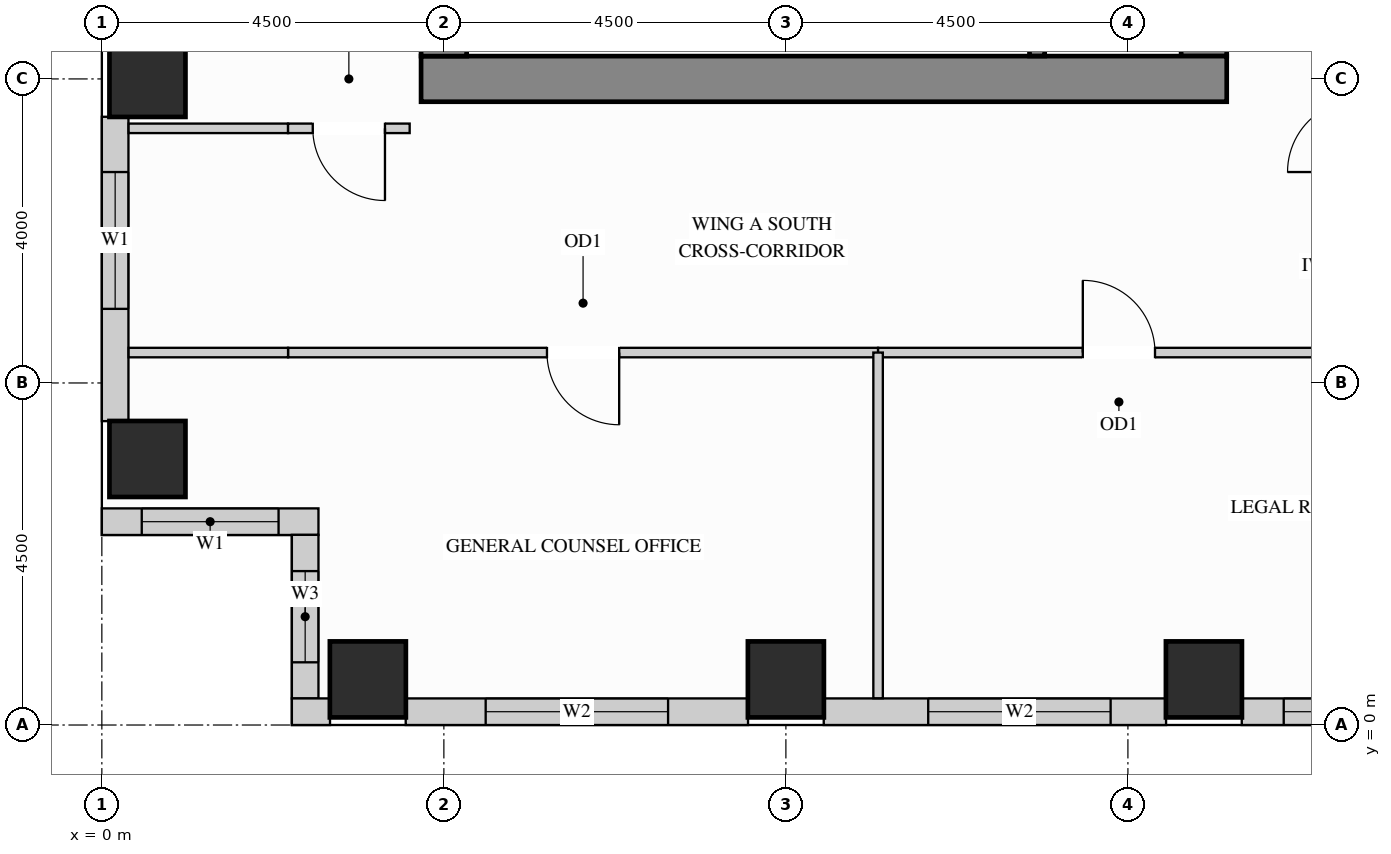
"""IFC4 building model, lengths in metres.
Left out: names, types, materials, properties, quantities, classifications, styles, units other than length and angle.
Written with IfcOpenShell. Run it as: python <this file> out.ifc"""

import sys

from ifc_helpers import new_model, si_unit, direction, frame, frame_2d, origin, origin_2d, place, context, subcontext, project, spatial, rectangle, extrude, source, transform, mapped, element, fill, save


model = new_model("IFC4")
c1 = context("Model", 3, precision=1e-05, world=origin(), true_north=direction((0.0, 1.0)))
c2 = subcontext(c1, "Body", "Model", "MODEL_VIEW")
j1 = project(units=[si_unit("LENGTHUNIT", "METRE"), si_unit("PLANEANGLEUNIT", "RADIAN")], contexts=[c1])
p1 = place(None, origin())
s1 = spatial("IfcSite", under=j1, at=p1, CompositionType="ELEMENT")
p2 = place(p1, origin())
s2 = spatial("IfcBuilding", under=s1, at=p2, CompositionType="ELEMENT")
p3 = place(p2, frame((0.0, 0.0, 153.9)))
s3 = spatial("IfcBuildingStorey", under=s2, at=p3, CompositionType="ELEMENT", Elevation=153.9)
m1 = source(origin(), c2, "Body", "SweptSolid", [
    extrude(rectangle(XDim=1.0, YDim=1.0, at=origin_2d()), origin(), (0.0, 0.0, 1.0), 3.4),
])
for number, where, z_axis, x_axis in (
    (1, (14.5, 0.6, 0.0), (0.0, 0.0, 1.0), (1.0, 0.0, 0.0)),
    (2, (3.5, 0.6, 0.0), (0.0, 0.0, 1.0), (1.0, 0.0, 0.0)),
    (3, (9.0, 0.6, 0.0), (0.0, 0.0, 1.0), (1.0, 0.0, 0.0)),
    (4, (0.6, 3.5, 0.0), (0.0, 0.0, 1.0), (1.0, 0.0, 0.0)),
    (5, (0.6, 8.5, 0.0), (0.0, 0.0, 1.0), (1.0, 0.0, 0.0)),
):
    element("IfcColumn", number, at=place(p3, frame(where, z_axis=z_axis, x_axis=x_axis)), inside=s3, PredefinedType="COLUMN", context=c2, shape_type="MappedRepresentation", body=[
        mapped(m1, transform((0.0, 0.0, 0.0), x_axis=(1.0, 0.0, 0.0), y_axis=(0.0, 1.0, 0.0), z_axis=(0.0, 0.0, 1.0))),
    ])
m2 = source(origin(), c2, "Body", "SweptSolid", [
    extrude(rectangle(XDim=10.02, YDim=0.6, at=frame_2d((5.01, 0.0))), origin(), (0.0, 0.0, 1.0), 3.4),
])
p4 = place(p3, frame((14.5, 8.8, 0.0), z_axis=(0.0, 0.0, 1.0), x_axis=(0.0, 1.0, 0.0)))
e6 = element("IfcWall", 6, at=p4, inside=s3, PredefinedType="SHEAR", context=c2, shape_type="MappedRepresentation", body=[
    mapped(m2, transform((0.0, 0.0, 0.0), x_axis=(1.0, 0.0, 0.0), y_axis=(0.0, 1.0, 0.0), z_axis=(0.0, 0.0, 1.0))),
])
m3 = source(origin(), c2, "Body", "SweptSolid", [
    extrude(rectangle(XDim=10.6, YDim=0.6, at=frame_2d((5.3, 0.0))), origin(), (0.0, 0.0, 1.0), 3.4),
])
p5 = place(p3, frame((4.2, 8.5, 0.0), z_axis=(0.0, 0.0, 1.0), x_axis=(1.0, 0.0, 0.0)))
e7 = element("IfcWall", 7, at=p5, inside=s3, PredefinedType="SHEAR", context=c2, shape_type="MappedRepresentation", body=[
    mapped(m3, transform((0.0, 0.0, 0.0), x_axis=(1.0, 0.0, 0.0), y_axis=(0.0, 1.0, 0.0), z_axis=(0.0, 0.0, 1.0))),
])
m4 = source(origin(), c2, "Body", "SweptSolid", [
    extrude(rectangle(XDim=20.4, YDim=0.6, at=frame_2d((10.2, 0.0))), origin(), (0.0, 0.0, 1.0), 3.4),
])
p6 = place(p3, frame((4.5, 8.8, 0.0), z_axis=(0.0, 0.0, 1.0), x_axis=(0.0, 1.0, 0.0)))
e8 = element("IfcWall", 8, at=p6, inside=s3, PredefinedType="SHEAR", context=c2, shape_type="MappedRepresentation", body=[
    mapped(m4, transform((0.0, 0.0, 0.0), x_axis=(1.0, 0.0, 0.0), y_axis=(0.0, 1.0, 0.0), z_axis=(0.0, 0.0, 1.0))),
])
p7 = place(p3, frame((0.175, 8.002, 0.0), z_axis=(0.0, 0.0, 1.0), x_axis=(0.0, -1.0, 0.0)))
e9 = element("IfcWall", 9, at=p7, inside=s3, PredefinedType="SOLIDWALL", context=c2, shape_type="SweptSolid", body=[
    extrude(rectangle(XDim=4.004, YDim=0.35, at=frame_2d((2.002, 0.0))), origin(), (0.0, 0.0, 1.0), 2.612),
])
p8 = place(p7, frame((0.727, 0.0, 0.78)))
e10 = element("IfcOpeningElement", 10, at=p8, cuts=e9, PredefinedType="OPENING", context=c2, shape_type="SweptSolid", body=[
    extrude(rectangle(XDim=1.8, YDim=1.652, at=frame_2d((0.9, 0.826))), frame((0.0, 0.185, 0.0), z_axis=(0.0, -1.0, 0.0), x_axis=(1.0, 0.0, 0.0)), (0.0, 0.0, 1.0), 0.37),
])
p9 = place(p3, frame((0.0, 2.675, 0.0), z_axis=(0.0, 0.0, 1.0), x_axis=(1.0, 0.0, 0.0)))
e11 = element("IfcWall", 11, at=p9, inside=s3, PredefinedType="SOLIDWALL", context=c2, shape_type="SweptSolid", body=[
    extrude(rectangle(XDim=2.85, YDim=0.35, at=frame_2d((1.425, 0.0))), origin(), (0.0, 0.0, 1.0), 3.385),
])
p10 = place(p9, frame((0.525, 0.0, 0.78)))
e12 = element("IfcOpeningElement", 12, at=p10, cuts=e11, PredefinedType="OPENING", context=c2, shape_type="SweptSolid", body=[
    extrude(rectangle(XDim=1.8, YDim=2.1, at=frame_2d((0.9, 1.05))), frame((0.0, 0.185, 0.0), z_axis=(0.0, -1.0, 0.0), x_axis=(1.0, 0.0, 0.0)), (0.0, 0.0, 1.0), 0.37),
])
p11 = place(p3, frame((2.675, 2.502, 0.0), z_axis=(0.0, 0.0, 1.0), x_axis=(0.0, -1.0, 0.0)))
e13 = element("IfcWall", 13, at=p11, inside=s3, PredefinedType="SOLIDWALL", context=c2, shape_type="SweptSolid", body=[
    extrude(rectangle(XDim=2.154, YDim=0.35, at=frame_2d((1.077, 0.0))), origin(), (0.0, 0.0, 1.0), 3.385),
])
p12 = place(p11, frame((0.477, 0.0, 0.78)))
e14 = element("IfcOpeningElement", 14, at=p12, cuts=e13, PredefinedType="OPENING", context=c2, shape_type="SweptSolid", body=[
    extrude(rectangle(XDim=1.2, YDim=2.1, at=frame_2d((0.6, 1.05))), frame((0.0, 0.185, 0.0), z_axis=(0.0, -1.0, 0.0), x_axis=(1.0, 0.0, 0.0)), (0.0, 0.0, 1.0), 0.37),
])
m5 = source(origin(), c2, "Body", "SweptSolid", [
    extrude(rectangle(XDim=0.502, YDim=0.35, at=frame_2d((0.251, 0.0))), origin(), (0.0, 0.0, 1.0), 3.385),
])
p13 = place(p3, frame((2.5, 0.175, 0.0), z_axis=(0.0, 0.0, 1.0), x_axis=(1.0, 0.0, 0.0)))
e15 = element("IfcWall", 15, at=p13, inside=s3, PredefinedType="SOLIDWALL", context=c2, shape_type="MappedRepresentation", body=[
    mapped(m5, transform((0.0, 0.0, 0.0), x_axis=(1.0, 0.0, 0.0), y_axis=(0.0, 1.0, 0.0), z_axis=(0.0, 0.0, 1.0))),
])
p14 = place(p3, frame((3.998, 0.175, 0.0), z_axis=(0.0, 0.0, 1.0), x_axis=(1.0, 0.0, 0.0)))
e16 = element("IfcWall", 16, at=p14, inside=s3, PredefinedType="SOLIDWALL", context=c2, shape_type="SweptSolid", body=[
    extrude(rectangle(XDim=4.504, YDim=0.35, at=frame_2d((2.252, 0.0))), origin(), (0.0, 0.0, 1.0), 2.612),
])
p15 = place(p14, frame((1.052, 0.0, 0.78)))
e17 = element("IfcOpeningElement", 17, at=p15, cuts=e16, PredefinedType="OPENING", context=c2, shape_type="SweptSolid", body=[
    extrude(rectangle(XDim=2.4, YDim=1.652, at=frame_2d((1.2, 0.826))), frame((0.0, 0.185, 0.0), z_axis=(0.0, -1.0, 0.0), x_axis=(1.0, 0.0, 0.0)), (0.0, 0.0, 1.0), 0.37),
])
p16 = place(p3, frame((9.498, 0.175, 0.0), z_axis=(0.0, 0.0, 1.0), x_axis=(1.0, 0.0, 0.0)))
e18 = element("IfcWall", 18, at=p16, inside=s3, PredefinedType="SOLIDWALL", context=c2, shape_type="SweptSolid", body=[
    extrude(rectangle(XDim=4.504, YDim=0.35, at=frame_2d((2.252, 0.0))), origin(), (0.0, 0.0, 1.0), 2.612),
])
p17 = place(p16, frame((1.375, 0.0, 0.78)))
e19 = element("IfcOpeningElement", 19, at=p17, cuts=e18, PredefinedType="OPENING", context=c2, shape_type="SweptSolid", body=[
    extrude(rectangle(XDim=2.4, YDim=1.652, at=frame_2d((1.2, 0.826))), frame((0.0, 0.185, 0.0), z_axis=(0.0, -1.0, 0.0), x_axis=(1.0, 0.0, 0.0)), (0.0, 0.0, 1.0), 0.37),
])
p18 = place(p3, frame((14.998, 0.175, 0.0), z_axis=(0.0, 0.0, 1.0), x_axis=(1.0, 0.0, 0.0)))
e20 = element("IfcWall", 20, at=p18, inside=s3, PredefinedType="SOLIDWALL", context=c2, shape_type="SweptSolid", body=[
    extrude(rectangle(XDim=3.504, YDim=0.35, at=frame_2d((1.752, 0.0))), origin(), (0.0, 0.0, 1.0), 2.612),
])
p19 = place(p18, frame((0.552, 0.0, 0.78)))
e21 = element("IfcOpeningElement", 21, at=p19, cuts=e20, PredefinedType="OPENING", context=c2, shape_type="SweptSolid", body=[
    extrude(rectangle(XDim=2.4, YDim=1.652, at=frame_2d((1.2, 0.826))), frame((0.0, 0.185, 0.0), z_axis=(0.0, -1.0, 0.0), x_axis=(1.0, 0.0, 0.0)), (0.0, 0.0, 1.0), 0.37),
])
m6 = source(origin(), c2, "Body", "SweptSolid", [
    extrude(rectangle(XDim=2.098, YDim=0.125, at=frame_2d((1.049, 0.0))), origin(), (0.0, 0.0, 1.0), 3.385),
])
p20 = place(p3, frame((0.352, 7.85, 0.0), z_axis=(0.0, 0.0, 1.0), x_axis=(1.0, 0.0, 0.0)))
e22 = element("IfcWall", 22, at=p20, inside=s3, PredefinedType="PARTITIONING", context=c2, shape_type="MappedRepresentation", body=[
    mapped(m6, transform((0.0, 0.0, 0.0), x_axis=(1.0, 0.0, 0.0), y_axis=(0.0, 1.0, 0.0), z_axis=(0.0, 0.0, 1.0))),
])
p21 = place(p3, frame((2.45, 7.85, 0.0), z_axis=(0.0, 0.0, 1.0), x_axis=(1.0, 0.0, 0.0)))
e23 = element("IfcWall", 23, at=p21, inside=s3, PredefinedType="PARTITIONING", context=c2, shape_type="SweptSolid", body=[
    extrude(rectangle(XDim=1.6, YDim=0.125, at=frame_2d((0.8, 0.0))), origin(), (0.0, 0.0, 1.0), 3.385),
])
p22 = place(p21, frame((0.325, 0.0, 0.0)))
e24 = element("IfcOpeningElement", 24, at=p22, cuts=e23, PredefinedType="OPENING", context=c2, shape_type="SweptSolid", body=[
    extrude(rectangle(XDim=0.95, YDim=2.15, at=frame_2d((0.475, 1.075))), frame((0.0, 0.073, 0.0), z_axis=(0.0, -1.0, 0.0), x_axis=(1.0, 0.0, 0.0)), (0.0, 0.0, 1.0), 0.145),
])
p23 = place(p3, frame((2.45, 4.9, 0.0), z_axis=(0.0, 0.0, 1.0), x_axis=(1.0, 0.0, 0.0)))
e25 = element("IfcWall", 25, at=p23, inside=s3, PredefinedType="PARTITIONING", context=c2, shape_type="SweptSolid", body=[
    extrude(rectangle(XDim=7.763, YDim=0.125, at=frame_2d((3.881, 0.0))), origin(), (0.0, 0.0, 1.0), 2.848),
])
p24 = place(p23, frame((3.406, 0.0, 0.0)))
e26 = element("IfcOpeningElement", 26, at=p24, cuts=e25, PredefinedType="OPENING", context=c2, shape_type="SweptSolid", body=[
    extrude(rectangle(XDim=0.95, YDim=2.15, at=frame_2d((0.475, 1.075))), frame((0.0, 0.073, 0.0), z_axis=(0.0, -1.0, 0.0), x_axis=(1.0, 0.0, 0.0)), (0.0, 0.0, 1.0), 0.145),
])
p25 = place(p3, frame((10.213, 4.9, 0.0), z_axis=(0.0, 0.0, 1.0), x_axis=(1.0, 0.0, 0.0)))
e27 = element("IfcWall", 27, at=p25, inside=s3, PredefinedType="PARTITIONING", context=c2, shape_type="SweptSolid", body=[
    extrude(rectangle(XDim=6.337, YDim=0.125, at=frame_2d((3.168, 0.0))), origin(), (0.0, 0.0, 1.0), 2.848),
])
p26 = place(p25, frame((2.694, 0.0, 0.0)))
e28 = element("IfcOpeningElement", 28, at=p26, cuts=e27, PredefinedType="OPENING", context=c2, shape_type="SweptSolid", body=[
    extrude(rectangle(XDim=0.95, YDim=2.15, at=frame_2d((0.475, 1.075))), frame((0.0, 0.073, 0.0), z_axis=(0.0, -1.0, 0.0), x_axis=(1.0, 0.0, 0.0)), (0.0, 0.0, 1.0), 0.145),
])
m7 = source(origin(), c2, "Body", "SweptSolid", [
    extrude(rectangle(XDim=2.098, YDim=0.125, at=frame_2d((1.049, 0.0))), origin(), (0.0, 0.0, 1.0), 2.848),
])
p27 = place(p3, frame((0.352, 4.9, 0.0), z_axis=(0.0, 0.0, 1.0), x_axis=(1.0, 0.0, 0.0)))
e29 = element("IfcWall", 29, at=p27, inside=s3, PredefinedType="PARTITIONING", context=c2, shape_type="MappedRepresentation", body=[
    mapped(m7, transform((0.0, 0.0, 0.0), x_axis=(1.0, 0.0, 0.0), y_axis=(0.0, 1.0, 0.0), z_axis=(0.0, 0.0, 1.0))),
])
m8 = source(origin(), c2, "Body", "SweptSolid", [
    extrude(rectangle(XDim=4.548, YDim=0.125, at=frame_2d((2.274, 0.0))), origin(), (0.0, 0.0, 1.0), 3.385),
])
p28 = place(p3, frame((10.213, 0.352, 0.0), z_axis=(0.0, 0.0, 1.0), x_axis=(0.0, 1.0, 0.0)))
e30 = element("IfcWall", 30, at=p28, inside=s3, PredefinedType="PARTITIONING", context=c2, shape_type="MappedRepresentation", body=[
    mapped(m8, transform((0.0, 0.0, 0.0), x_axis=(1.0, 0.0, 0.0), y_axis=(0.0, 1.0, 0.0), z_axis=(0.0, 0.0, 1.0))),
])
m9 = source(origin(), c2, "Body", "SweptSolid", [
    extrude(rectangle(XDim=3.753, YDim=0.2, at=frame_2d((1.876, 0.0))), origin(), (0.0, 0.0, 1.0), 3.4),
])
p29 = place(p3, frame((12.305, 8.802, 0.0), z_axis=(0.0, 0.0, 1.0), x_axis=(0.0, 1.0, 0.0)))
e31 = element("IfcWall", 31, at=p29, inside=s3, PredefinedType="SHEAR", context=c2, shape_type="MappedRepresentation", body=[
    mapped(m9, transform((0.0, 0.0, 0.0), x_axis=(1.0, 0.0, 0.0), y_axis=(0.0, 1.0, 0.0), z_axis=(0.0, 0.0, 1.0))),
])
m10 = source(origin(), c2, "Body", "SweptSolid", [
    extrude(rectangle(XDim=0.95, YDim=2.15, at=frame_2d((0.475, 1.075))), frame((0.0, 0.025, 0.0), z_axis=(0.0, -1.0, 0.0), x_axis=(1.0, 0.0, 0.0)), (0.0, 0.0, 1.0), 0.05),
])
p30 = place(p24, origin())
e32 = element("IfcDoor", 32, at=p30, inside=s3, OperationType="SINGLE_SWING_RIGHT", PredefinedType="DOOR", context=c2, shape_type="MappedRepresentation", body=[
    mapped(m10, transform((0.0, 0.0, 0.0), x_axis=(1.0, 0.0, 0.0), y_axis=(0.0, 1.0, 0.0), z_axis=(0.0, 0.0, 1.0))),
])
fill(e26, e32)
p31 = place(p26, origin())
e33 = element("IfcDoor", 33, at=p31, inside=s3, OperationType="SINGLE_SWING_LEFT", PredefinedType="DOOR", context=c2, shape_type="MappedRepresentation", body=[
    mapped(m10, transform((0.0, 0.0, 0.0), x_axis=(1.0, 0.0, 0.0), y_axis=(0.0, 1.0, 0.0), z_axis=(0.0, 0.0, 1.0))),
])
fill(e28, e33)
p32 = place(p22, origin())
e34 = element("IfcDoor", 34, at=p32, inside=s3, OperationType="SINGLE_SWING_RIGHT", PredefinedType="DOOR", context=c2, shape_type="MappedRepresentation", body=[
    mapped(m10, transform((0.0, 0.0, 0.0), x_axis=(1.0, 0.0, 0.0), y_axis=(0.0, 1.0, 0.0), z_axis=(0.0, 0.0, 1.0))),
])
fill(e24, e34)
m11 = source(origin(), c2, "Body", "SweptSolid", [
    extrude(rectangle(XDim=1.8, YDim=1.652, at=frame_2d((0.9, 0.826))), frame((0.0, 0.03, 0.0), z_axis=(0.0, -1.0, 0.0), x_axis=(1.0, 0.0, 0.0)), (0.0, 0.0, 1.0), 0.06),
])
p33 = place(p8, origin())
e35 = element("IfcWindow", 35, at=p33, inside=s3, PartitioningType="SINGLE_PANEL", PredefinedType="WINDOW", context=c2, shape_type="MappedRepresentation", body=[
    mapped(m11, transform((0.0, 0.0, 0.0), x_axis=(1.0, 0.0, 0.0), y_axis=(0.0, 1.0, 0.0), z_axis=(0.0, 0.0, 1.0))),
])
fill(e10, e35)
m12 = source(origin(), c2, "Body", "SweptSolid", [
    extrude(rectangle(XDim=1.8, YDim=2.1, at=frame_2d((0.9, 1.05))), frame((0.0, 0.03, 0.0), z_axis=(0.0, -1.0, 0.0), x_axis=(1.0, 0.0, 0.0)), (0.0, 0.0, 1.0), 0.06),
])
p34 = place(p10, origin())
e36 = element("IfcWindow", 36, at=p34, inside=s3, PartitioningType="SINGLE_PANEL", PredefinedType="WINDOW", context=c2, shape_type="MappedRepresentation", body=[
    mapped(m12, transform((0.0, 0.0, 0.0), x_axis=(1.0, 0.0, 0.0), y_axis=(0.0, 1.0, 0.0), z_axis=(0.0, 0.0, 1.0))),
])
fill(e12, e36)
m13 = source(origin(), c2, "Body", "SweptSolid", [
    extrude(rectangle(XDim=2.4, YDim=1.652, at=frame_2d((1.2, 0.826))), frame((0.0, 0.03, 0.0), z_axis=(0.0, -1.0, 0.0), x_axis=(1.0, 0.0, 0.0)), (0.0, 0.0, 1.0), 0.06),
])
p35 = place(p15, origin())
e37 = element("IfcWindow", 37, at=p35, inside=s3, PartitioningType="SINGLE_PANEL", PredefinedType="WINDOW", context=c2, shape_type="MappedRepresentation", body=[
    mapped(m13, transform((0.0, 0.0, 0.0), x_axis=(1.0, 0.0, 0.0), y_axis=(0.0, 1.0, 0.0), z_axis=(0.0, 0.0, 1.0))),
])
fill(e17, e37)
p36 = place(p17, origin())
e38 = element("IfcWindow", 38, at=p36, inside=s3, PartitioningType="SINGLE_PANEL", PredefinedType="WINDOW", context=c2, shape_type="MappedRepresentation", body=[
    mapped(m13, transform((0.0, 0.0, 0.0), x_axis=(1.0, 0.0, 0.0), y_axis=(0.0, 1.0, 0.0), z_axis=(0.0, 0.0, 1.0))),
])
fill(e19, e38)
p37 = place(p19, origin())
e39 = element("IfcWindow", 39, at=p37, inside=s3, PartitioningType="SINGLE_PANEL", PredefinedType="WINDOW", context=c2, shape_type="MappedRepresentation", body=[
    mapped(m13, transform((0.0, 0.0, 0.0), x_axis=(1.0, 0.0, 0.0), y_axis=(0.0, 1.0, 0.0), z_axis=(0.0, 0.0, 1.0))),
])
fill(e21, e39)
m14 = source(origin(), c2, "Body", "SweptSolid", [
    extrude(rectangle(XDim=1.2, YDim=2.1, at=frame_2d((0.6, 1.05))), frame((0.0, 0.03, 0.0), z_axis=(0.0, -1.0, 0.0), x_axis=(1.0, 0.0, 0.0)), (0.0, 0.0, 1.0), 0.06),
])
p38 = place(p12, origin())
e40 = element("IfcWindow", 40, at=p38, inside=s3, PartitioningType="SINGLE_PANEL", PredefinedType="WINDOW", context=c2, shape_type="MappedRepresentation", body=[
    mapped(m14, transform((0.0, 0.0, 0.0), x_axis=(1.0, 0.0, 0.0), y_axis=(0.0, 1.0, 0.0), z_axis=(0.0, 0.0, 1.0))),
])
fill(e14, e40)
save(model, sys.argv[1])
